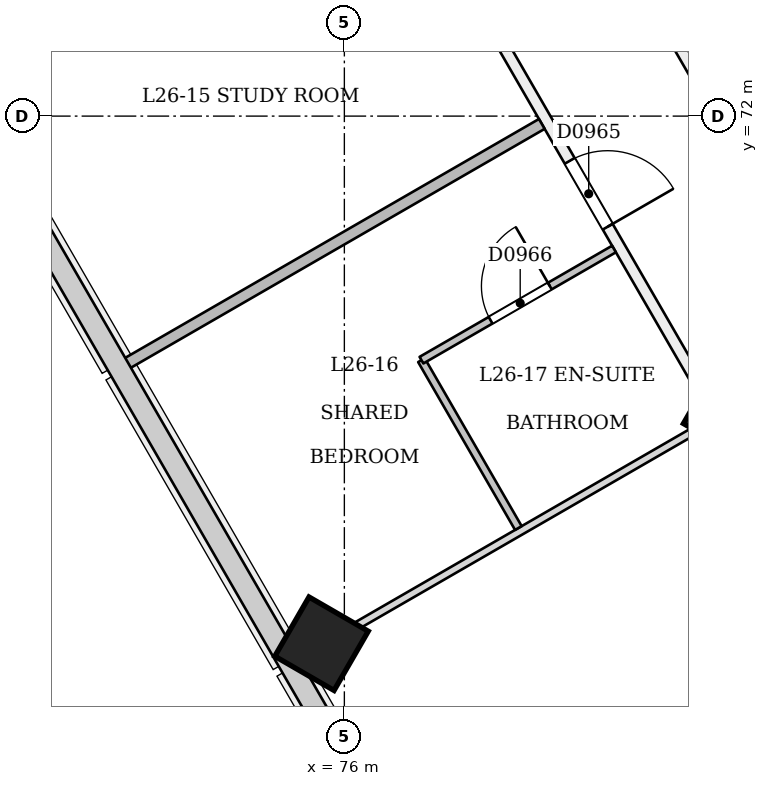
"""IFC4 building model, lengths in metres.
Left out: names, types, materials, properties, quantities, classifications, styles, units other than length and angle.
Written with IfcOpenShell. Run it as: python <this file> out.ifc"""

import sys

from ifc_helpers import new_model, si_unit, direction, frame, frame_2d, origin, origin_2d, place, context, subcontext, project, spatial, rectangle, extrude, element, fill, save


model = new_model("IFC4")
c1 = context("Model", 3, precision=1e-05, world=origin(), true_north=direction((0.0, 1.0)))
c2 = subcontext(c1, "Body", "Model", "MODEL_VIEW")
j1 = project(units=[si_unit("LENGTHUNIT", "METRE"), si_unit("PLANEANGLEUNIT", "RADIAN")], contexts=[c1])
p1 = place(None, origin())
s1 = spatial("IfcSite", under=j1, at=p1, CompositionType="ELEMENT")
p2 = place(p1, origin())
s2 = spatial("IfcBuilding", under=s1, at=p2, CompositionType="ELEMENT")
p3 = place(p2, frame((0.0, 0.0, 104.4)))
s3 = spatial("IfcBuildingStorey", under=s2, at=p3, CompositionType="ELEMENT", Elevation=104.4)
p4 = place(p3, frame((80.912, 68.037, -0.021), z_axis=(0.022221406801, 0.038413224561, 0.999014831351), x_axis=(-0.866021388936, -0.498527757451, 0.038432134412)))
e1 = element("IfcColumn", 1, at=p4, inside=s3, PredefinedType="COLUMN", context=c2, shape_type="SweptSolid", body=[
    extrude(rectangle(XDim=0.7, YDim=0.7, at=origin_2d()), origin(), (0.0, 0.0, 1.0), 3.604),
])
p5 = place(p3, frame((75.672, 65.011, -0.027), z_axis=(0.022222852987, 0.038483477124, 0.999012095419), x_axis=(-0.865639360837, -0.499186706709, 0.038485436403)))
e2 = element("IfcColumn", 2, at=p5, inside=s3, PredefinedType="COLUMN", context=c2, shape_type="SweptSolid", body=[
    extrude(rectangle(XDim=0.9, YDim=0.9, at=origin_2d()), origin(), (0.0, 0.0, 1.0), 3.604),
])
p6 = place(p3, frame((63.745, 97.773, 0.0), z_axis=(0.0, 0.0, 1.0), x_axis=(0.500001045382, -0.866024800232, 0.0)))
e3 = element("IfcWall", 3, at=p6, inside=s3, PredefinedType="PARTITIONING", context=c2, shape_type="SweptSolid", body=[
    extrude(rectangle(XDim=41.671, YDim=0.15, at=frame_2d((20.836, 0.0))), origin(), (0.0, 0.0, 1.0), 2.7),
])
p7 = place(p6, frame((2.868, 0.0, 0.0)))
e4 = element("IfcOpeningElement", 4, at=p7, cuts=e3, PredefinedType="OPENING", context=c2, shape_type="SweptSolid", body=[
    extrude(rectangle(XDim=1.2, YDim=2.1, at=frame_2d((0.6, 1.05))), frame((0.0, 0.085, 0.0), z_axis=(0.0, -1.0, 0.0), x_axis=(1.0, 0.0, 0.0)), (0.0, 0.0, 1.0), 0.171),
])
p8 = place(p6, frame((10.115, 0.0, 0.0)))
e5 = element("IfcOpeningElement", 5, at=p8, cuts=e3, PredefinedType="OPENING", context=c2, shape_type="SweptSolid", body=[
    extrude(rectangle(XDim=1.0, YDim=2.1, at=frame_2d((0.5, 1.05))), frame((0.0, 0.085, 0.0), z_axis=(0.0, -1.0, 0.0), x_axis=(1.0, 0.0, 0.0)), (0.0, 0.0, 1.0), 0.171),
])
p9 = place(p6, frame((12.44, 0.0, 0.0)))
e6 = element("IfcOpeningElement", 6, at=p9, cuts=e3, PredefinedType="OPENING", context=c2, shape_type="SweptSolid", body=[
    extrude(rectangle(XDim=1.0, YDim=2.1, at=frame_2d((0.5, 1.05))), frame((0.0, 0.085, 0.0), z_axis=(0.0, -1.0, 0.0), x_axis=(1.0, 0.0, 0.0)), (0.0, 0.0, 1.0), 0.171),
])
p10 = place(p6, frame((19.231, 0.0, 0.0)))
e7 = element("IfcOpeningElement", 7, at=p10, cuts=e3, PredefinedType="OPENING", context=c2, shape_type="SweptSolid", body=[
    extrude(rectangle(XDim=1.0, YDim=2.1, at=frame_2d((0.5, 1.05))), frame((0.0, 0.085, 0.0), z_axis=(0.0, -1.0, 0.0), x_axis=(1.0, 0.0, 0.0)), (0.0, 0.0, 1.0), 0.171),
])
p11 = place(p6, frame((21.556, 0.0, 0.0)))
e8 = element("IfcOpeningElement", 8, at=p11, cuts=e3, PredefinedType="OPENING", context=c2, shape_type="SweptSolid", body=[
    extrude(rectangle(XDim=1.0, YDim=2.1, at=frame_2d((0.5, 1.05))), frame((0.0, 0.085, 0.0), z_axis=(0.0, -1.0, 0.0), x_axis=(1.0, 0.0, 0.0)), (0.0, 0.0, 1.0), 0.171),
])
p12 = place(p6, frame((27.086, 0.0, 0.0)))
e9 = element("IfcOpeningElement", 9, at=p12, cuts=e3, PredefinedType="OPENING", context=c2, shape_type="SweptSolid", body=[
    extrude(rectangle(XDim=1.0, YDim=2.1, at=frame_2d((0.5, 1.05))), frame((0.0, 0.085, 0.0), z_axis=(0.0, -1.0, 0.0), x_axis=(1.0, 0.0, 0.0)), (0.0, 0.0, 1.0), 0.171),
])
p13 = place(p6, frame((30.44, 0.0, 0.0)))
e10 = element("IfcOpeningElement", 10, at=p13, cuts=e3, PredefinedType="OPENING", context=c2, shape_type="SweptSolid", body=[
    extrude(rectangle(XDim=1.0, YDim=2.1, at=frame_2d((0.5, 1.05))), frame((0.0, 0.085, 0.0), z_axis=(0.0, -1.0, 0.0), x_axis=(1.0, 0.0, 0.0)), (0.0, 0.0, 1.0), 0.171),
])
p14 = place(p6, frame((37.619, 0.0, 0.0)))
e11 = element("IfcOpeningElement", 11, at=p14, cuts=e3, PredefinedType="OPENING", context=c2, shape_type="SweptSolid", body=[
    extrude(rectangle(XDim=1.2, YDim=2.1, at=frame_2d((0.6, 1.05))), frame((0.0, 0.085, 0.0), z_axis=(0.0, -1.0, 0.0), x_axis=(1.0, 0.0, 0.0)), (0.0, 0.0, 1.0), 0.171),
])
p15 = place(p3, frame((85.0, 64.958, 0.0), z_axis=(0.0, 0.0, 1.0), x_axis=(-0.500001082908, 0.866024778566, 0.0)))
e12 = element("IfcWall", 12, at=p15, inside=s3, PredefinedType="PARTITIONING", context=c2, shape_type="SweptSolid", body=[
    extrude(rectangle(XDim=29.378, YDim=0.15, at=frame_2d((14.689, 0.0))), origin(), (0.0, 0.0, 1.0), 3.1),
])
p16 = place(p15, frame((20.56, 0.0, 0.0)))
e13 = element("IfcOpeningElement", 13, at=p16, cuts=e12, PredefinedType="OPENING", context=c2, shape_type="SweptSolid", body=[
    extrude(rectangle(XDim=0.9, YDim=2.1, at=frame_2d((0.45, 1.05))), frame((0.0, 0.085, 0.0), z_axis=(0.0, -1.0, 0.0), x_axis=(1.0, 0.0, 0.0)), (0.0, 0.0, 1.0), 0.171),
])
p17 = place(p15, frame((9.401, 0.0, 0.0)))
e14 = element("IfcOpeningElement", 14, at=p17, cuts=e12, PredefinedType="OPENING", context=c2, shape_type="SweptSolid", body=[
    extrude(rectangle(XDim=1.0, YDim=2.1, at=frame_2d((0.5, 1.05))), frame((0.0, 0.085, 0.0), z_axis=(0.0, -1.0, 0.0), x_axis=(1.0, 0.0, 0.0)), (0.0, 0.0, 1.0), 0.171),
])
p18 = place(p15, frame((5.849, 0.0, 0.0)))
e15 = element("IfcOpeningElement", 15, at=p18, cuts=e12, PredefinedType="OPENING", context=c2, shape_type="SweptSolid", body=[
    extrude(rectangle(XDim=1.0, YDim=2.1, at=frame_2d((0.5, 1.05))), frame((0.0, 0.085, 0.0), z_axis=(0.0, -1.0, 0.0), x_axis=(1.0, 0.0, 0.0)), (0.0, 0.0, 1.0), 0.171),
])
p19 = place(p15, frame((17.129, 0.0, 0.0)))
e16 = element("IfcOpeningElement", 16, at=p19, cuts=e12, PredefinedType="OPENING", context=c2, shape_type="SweptSolid", body=[
    extrude(rectangle(XDim=1.2, YDim=2.1, at=frame_2d((0.6, 1.05))), frame((0.0, 0.085, 0.0), z_axis=(0.0, -1.0, 0.0), x_axis=(1.0, 0.0, 0.0)), (0.0, 0.0, 1.0), 0.171),
])
p20 = place(p15, frame((12.854, 0.0, 0.0)))
e17 = element("IfcOpeningElement", 17, at=p20, cuts=e12, PredefinedType="OPENING", context=c2, shape_type="SweptSolid", body=[
    extrude(rectangle(XDim=1.0, YDim=2.1, at=frame_2d((0.5, 1.05))), frame((0.0, 0.085, 0.0), z_axis=(0.0, -1.0, 0.0), x_axis=(1.0, 0.0, 0.0)), (0.0, 0.0, 1.0), 0.171),
])
p21 = place(p15, frame((2.32, 0.0, 0.0)))
e18 = element("IfcOpeningElement", 18, at=p21, cuts=e12, PredefinedType="OPENING", context=c2, shape_type="SweptSolid", body=[
    extrude(rectangle(XDim=1.0, YDim=2.1, at=frame_2d((0.5, 1.05))), frame((0.0, 0.085, 0.0), z_axis=(0.0, -1.0, 0.0), x_axis=(1.0, 0.0, 0.0)), (0.0, 0.0, 1.0), 0.171),
])
p22 = place(p15, frame((25.198, 0.0, 0.0)))
e19 = element("IfcOpeningElement", 19, at=p22, cuts=e12, PredefinedType="OPENING", context=c2, shape_type="SweptSolid", body=[
    extrude(rectangle(XDim=1.0, YDim=2.1, at=frame_2d((0.5, 1.05))), frame((0.0, 0.085, 0.0), z_axis=(0.0, -1.0, 0.0), x_axis=(1.0, 0.0, 0.0)), (0.0, 0.0, 1.0), 0.171),
])
p23 = place(p3, frame((70.87, 72.632, 0.0), z_axis=(0.0, 0.0, 1.0), x_axis=(0.866019260715, 0.500010639957, 0.0)))
e20 = element("IfcWall", 20, at=p23, inside=s3, PredefinedType="PARTITIONING", context=c2, shape_type="SweptSolid", body=[
    extrude(rectangle(XDim=3.52, YDim=0.15, at=frame_2d((1.76, 0.0))), origin(), (0.0, 0.0, 1.0), 2.6),
])
p24 = place(p3, frame((73.102, 68.724, 0.0), z_axis=(0.0, 0.0, 1.0), x_axis=(0.866025401434, 0.500000004071, 0.0)))
e21 = element("IfcWall", 21, at=p24, inside=s3, PredefinedType="PARTITIONING", context=c2, shape_type="SweptSolid", body=[
    extrude(rectangle(XDim=6.345, YDim=0.15, at=frame_2d((3.173, 0.0))), origin(), (0.0, 0.0, 1.0), 2.6),
])
p25 = place(p3, frame((78.289, 66.581, 0.0), z_axis=(0.0, 0.0, 1.0), x_axis=(-0.499990435942, 0.866030925526, 0.0)))
e22 = element("IfcWall", 22, at=p25, inside=s3, PredefinedType="PARTITIONING", context=c2, shape_type="SweptSolid", body=[
    extrude(rectangle(XDim=2.55, YDim=0.1, at=frame_2d((1.275, 0.0))), origin(), (0.0, 0.0, 1.0), 2.7),
])
p26 = place(p3, frame((77.014, 68.789, 0.0), z_axis=(0.0, 0.0, 1.0), x_axis=(0.866025730634, 0.499999433879, 0.0)))
e23 = element("IfcWall", 23, at=p26, inside=s3, PredefinedType="PARTITIONING", context=c2, shape_type="SweptSolid", body=[
    extrude(rectangle(XDim=2.925, YDim=0.1, at=frame_2d((1.462, 0.0))), origin(), (0.0, 0.0, 1.0), 3.1),
])
p27 = place(p26, frame((1.05, 0.0, 0.0)))
e24 = element("IfcOpeningElement", 24, at=p27, cuts=e23, PredefinedType="OPENING", context=c2, shape_type="SweptSolid", body=[
    extrude(rectangle(XDim=0.9, YDim=2.1, at=frame_2d((0.45, 1.05))), frame((0.0, 0.061, 0.0), z_axis=(0.0, -1.0, 0.0), x_axis=(1.0, 0.0, 0.0)), (0.0, 0.0, 1.0), 0.121),
])
p28 = place(p3, frame((75.37, 64.837, 0.0), z_axis=(0.0, 0.0, 1.0), x_axis=(0.866015887322, 0.500016482634, 0.0)))
e25 = element("IfcWall", 25, at=p28, inside=s3, PredefinedType="PARTITIONING", context=c2, shape_type="SweptSolid", body=[
    extrude(rectangle(XDim=6.325, YDim=0.1, at=frame_2d((3.163, 0.0))), origin(), (0.0, 0.0, 1.0), 2.6),
])
p29 = place(p13, origin())
e26 = element("IfcDoor", 26, at=p29, inside=s3, OperationType="SINGLE_SWING_RIGHT", PredefinedType="NOTDEFINED", context=c2, shape_type="SweptSolid", body=[
    extrude(rectangle(XDim=1.0, YDim=2.1, at=frame_2d((0.5, 1.05))), frame((0.0, 0.025, 0.0), z_axis=(0.0, -1.0, 0.0), x_axis=(1.0, 0.0, 0.0)), (0.0, 0.0, 1.0), 0.05),
])
fill(e10, e26)
p30 = place(p27, origin())
e27 = element("IfcDoor", 27, at=p30, inside=s3, OperationType="SINGLE_SWING_RIGHT", PredefinedType="NOTDEFINED", context=c2, shape_type="SweptSolid", body=[
    extrude(rectangle(XDim=0.9, YDim=2.1, at=frame_2d((0.45, 1.05))), frame((0.0, 0.025, 0.0), z_axis=(0.0, -1.0, 0.0), x_axis=(1.0, 0.0, 0.0)), (0.0, 0.0, 1.0), 0.05),
])
fill(e24, e27)
save(model, sys.argv[1])
